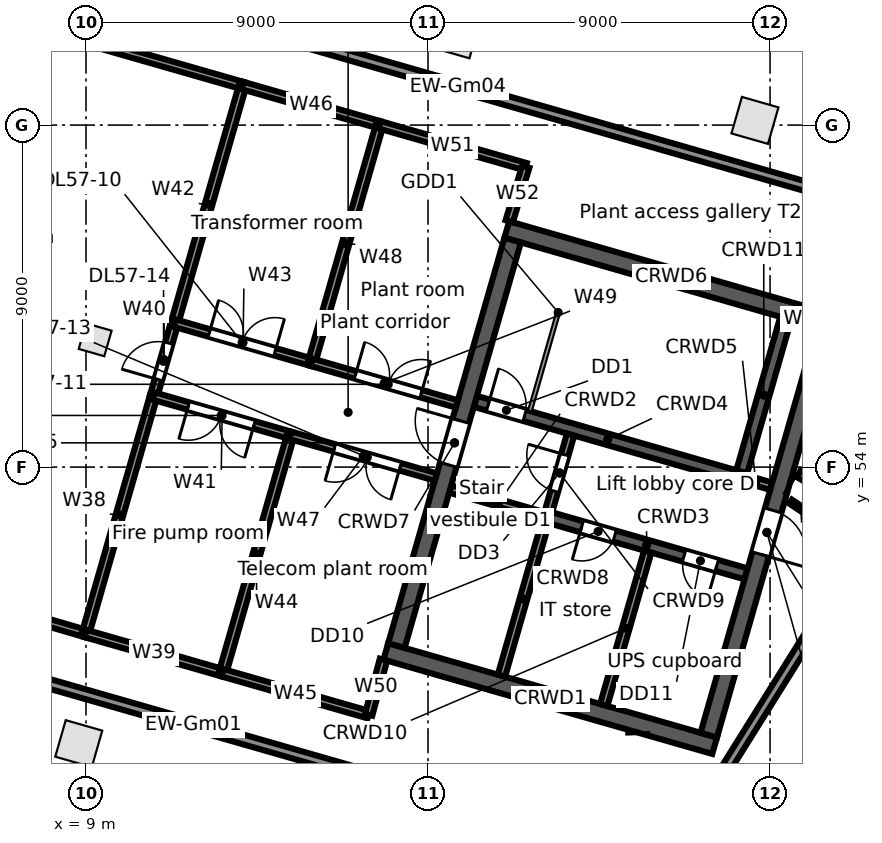
"""IFC4 building model, lengths in metres.
Left out: names, types, materials, properties, quantities, classifications, styles, units other than length and angle.
Written with IfcOpenShell. Run it as: python <this file> out.ifc"""

import sys

from ifc_helpers import new_model, si_unit, direction, frame, frame_2d, origin, origin_2d, place, context, subcontext, project, spatial, rectangle, extrude, element, fill, save


model = new_model("IFC4")
c1 = context("Model", 3, precision=1e-05, world=origin(), true_north=direction((0.0, 1.0)))
c2 = subcontext(c1, "Body", "Model", "MODEL_VIEW")
j1 = project(units=[si_unit("LENGTHUNIT", "METRE"), si_unit("PLANEANGLEUNIT", "RADIAN")], contexts=[c1])
p1 = place(None, origin())
s1 = spatial("IfcSite", under=j1, at=p1, CompositionType="ELEMENT")
p2 = place(p1, origin())
s2 = spatial("IfcBuilding", under=s1, at=p2, CompositionType="ELEMENT")
p3 = place(p2, frame((0.0, 0.0, 258.2)))
s3 = spatial("IfcBuildingStorey", under=s2, at=p3, CompositionType="ELEMENT", Elevation=258.2)
for number, where, z_axis, x_axis in (
    (1, (26.603, 63.124, 0.0), (0.0, 0.0, 1.0), (-0.961, 0.276, 0.0)),
    (2, (18.746, 65.376, 0.0), (0.0, 0.0, 1.0), (-0.961, 0.276, 0.0)),
    (3, (8.81, 46.722, 0.0), (0.0, 0.0, 1.0), (0.961, -0.276, 0.0)),
):
    element("IfcColumn", number, at=place(p3, frame(where, z_axis=z_axis, x_axis=x_axis)), inside=s3, PredefinedType="COLUMN", context=c2, shape_type="SweptSolid", body=[
        extrude(rectangle(XDim=1.0, YDim=1.0, at=origin_2d()), origin(), (0.0, 0.0, 1.0), 4.22),
    ])
p4 = place(p3, frame((9.241, 57.35, 0.0), z_axis=(0.0, 0.0, 1.0), x_axis=(0.961261695938, -0.275637355817, 0.0)))
e4 = element("IfcColumn", 4, at=p4, inside=s3, PredefinedType="COLUMN", context=c2, shape_type="SweptSolid", body=[
    extrude(rectangle(XDim=0.7, YDim=0.7, at=origin_2d()), origin(), (0.0, 0.0, 1.0), 4.22),
])
p5 = place(p3, frame((23.919, 43.742, 0.0), z_axis=(0.0, 0.0, 1.0), x_axis=(-0.96126099052, 0.27563981589, 0.0)))
e5 = element("IfcWall", 5, at=p5, inside=s3, PredefinedType="STANDARD", context=c2, shape_type="SweptSolid", body=[
    extrude(rectangle(XDim=25.163, YDim=0.25, at=frame_2d((12.581, 0.0))), origin(), (0.0, 0.0, 1.0), 3.52),
])
p6 = place(p3, frame((34.364, 59.711, 0.0), z_axis=(0.0, 0.0, 1.0), x_axis=(-0.529923238965, -0.848045612455, 0.0)))
e6 = element("IfcWall", 6, at=p6, inside=s3, PredefinedType="STANDARD", context=c2, shape_type="SweptSolid", body=[
    extrude(rectangle(XDim=18.554, YDim=0.25, at=frame_2d((9.277, 0.0))), origin(), (0.0, 0.0, 1.0), 4.22),
])
p7 = place(p3, frame((3.135, 68.5, 0.0), z_axis=(0.0, 0.0, 1.0), x_axis=(0.961262369705, -0.275635006103, 0.0)))
e7 = element("IfcWall", 7, at=p7, inside=s3, PredefinedType="STANDARD", context=c2, shape_type="SweptSolid", body=[
    extrude(rectangle(XDim=32.562, YDim=0.25, at=frame_2d((16.281, 0.0))), origin(), (0.0, 0.0, 1.0), 3.52),
])
p8 = place(p3, frame((16.89, 49.149, 0.0), z_axis=(0.0, 0.0, 1.0), x_axis=(0.96126248289, -0.275634611374, 0.0)))
e8 = element("IfcWall", 8, at=p8, inside=s3, PredefinedType="SOLIDWALL", context=c2, shape_type="SweptSolid", body=[
    extrude(rectangle(XDim=9.0, YDim=0.45, at=frame_2d((4.5, 0.0))), origin(), (0.0, 0.0, 1.0), 4.22),
])
p9 = place(p3, frame((18.583, 53.423, 0.0), z_axis=(0.0, 0.0, 1.0), x_axis=(0.961259287968, -0.275645753268, 0.0)))
e9 = element("IfcWall", 9, at=p9, inside=s3, PredefinedType="SOLIDWALL", context=c2, shape_type="SweptSolid", body=[
    extrude(rectangle(XDim=2.65, YDim=0.2, at=frame_2d((1.325, 0.0))), origin(), (0.0, 0.0, 1.0), 4.22),
])
p10 = place(p3, frame((21.131, 52.692, 0.0), z_axis=(0.0, 0.0, 1.0), x_axis=(0.961261488075, -0.275638080722, 0.0)))
e10 = element("IfcWall", 10, at=p10, inside=s3, PredefinedType="SOLIDWALL", context=c2, shape_type="SweptSolid", body=[
    extrude(rectangle(XDim=5.45, YDim=0.3, at=frame_2d((2.725, 0.0))), origin(), (0.0, 0.0, 1.0), 4.22),
])
p11 = place(p10, frame((0.95, 0.0, 0.0)))
e11 = element("IfcOpeningElement", 11, at=p11, cuts=e10, PredefinedType="OPENING", context=c2, shape_type="SweptSolid", body=[
    extrude(rectangle(XDim=0.9, YDim=2.1, at=frame_2d((0.45, 1.05))), frame((0.0, 0.16, 0.0), z_axis=(0.0, -1.0, 0.0), x_axis=(1.0, 0.0, 0.0)), (0.0, 0.0, 1.0), 0.32),
])
p12 = place(p10, frame((3.75, 0.0, 0.0)))
e12 = element("IfcOpeningElement", 12, at=p12, cuts=e10, PredefinedType="OPENING", context=c2, shape_type="SweptSolid", body=[
    extrude(rectangle(XDim=0.9, YDim=2.1, at=frame_2d((0.45, 1.05))), frame((0.0, 0.16, 0.0), z_axis=(0.0, -1.0, 0.0), x_axis=(1.0, 0.0, 0.0)), (0.0, 0.0, 1.0), 0.32),
])
p13 = place(p3, frame((19.245, 55.73, 0.0), z_axis=(0.0, 0.0, 1.0), x_axis=(0.961263007877, -0.275632780503, 0.0)))
e13 = element("IfcWall", 13, at=p13, inside=s3, PredefinedType="SOLIDWALL", context=c2, shape_type="SweptSolid", body=[
    extrude(rectangle(XDim=7.25, YDim=0.3, at=frame_2d((3.625, 0.0))), origin(), (0.0, 0.0, 1.0), 4.22),
])
p14 = place(p13, frame((0.35, 0.0, 0.0)))
e14 = element("IfcOpeningElement", 14, at=p14, cuts=e13, PredefinedType="OPENING", context=c2, shape_type="SweptSolid", body=[
    extrude(rectangle(XDim=1.0, YDim=2.1, at=frame_2d((0.5, 1.05))), frame((0.0, 0.16, 0.0), z_axis=(0.0, -1.0, 0.0), x_axis=(1.0, 0.0, 0.0)), (0.0, 0.0, 1.0), 0.32),
])
p15 = place(p3, frame((26.214, 53.732, 0.0), z_axis=(0.0, 0.0, 1.0), x_axis=(0.961241665642, -0.275707200184, 0.0)))
e15 = element("IfcWall", 15, at=p15, inside=s3, PredefinedType="SOLIDWALL", context=c2, shape_type="SweptSolid", body=[
    extrude(rectangle(XDim=0.85, YDim=0.2, at=frame_2d((0.425, 0.0))), origin(), (0.0, 0.0, 1.0), 4.22),
])
p16 = place(p3, frame((20.073, 60.252, 0.0), z_axis=(0.0, 0.0, 1.0), x_axis=(0.96126248289, -0.275634611374, 0.0)))
e16 = element("IfcWall", 16, at=p16, inside=s3, PredefinedType="SOLIDWALL", context=c2, shape_type="SweptSolid", body=[
    extrude(rectangle(XDim=9.0, YDim=0.45, at=frame_2d((4.5, 0.0))), origin(), (0.0, 0.0, 1.0), 4.22),
])
p17 = place(p3, frame((17.168, 49.303, 0.0), z_axis=(0.0, 0.0, 1.0), x_axis=(0.275638974822, 0.961261231695, 0.0)))
e17 = element("IfcWall", 17, at=p17, inside=s3, PredefinedType="SOLIDWALL", context=c2, shape_type="SweptSolid", body=[
    extrude(rectangle(XDim=11.1, YDim=0.45, at=frame_2d((5.55, 0.0))), origin(), (0.0, 0.0, 1.0), 4.22),
])
p18 = place(p17, frame((4.95, 0.0, 0.0)))
e18 = element("IfcOpeningElement", 18, at=p18, cuts=e17, PredefinedType="OPENING", context=c2, shape_type="SweptSolid", body=[
    extrude(rectangle(XDim=1.2, YDim=2.1, at=frame_2d((0.6, 1.05))), frame((0.0, 0.235, 0.0), z_axis=(0.0, -1.0, 0.0), x_axis=(1.0, 0.0, 0.0)), (0.0, 0.0, 1.0), 0.47),
])
p19 = place(p3, frame((19.932, 48.511, 0.0), z_axis=(0.0, 0.0, 1.0), x_axis=(0.275642273411, 0.961260285827, 0.0)))
e19 = element("IfcWall", 19, at=p19, inside=s3, PredefinedType="SOLIDWALL", context=c2, shape_type="SweptSolid", body=[
    extrude(rectangle(XDim=4.2, YDim=0.2, at=frame_2d((2.1, 0.0))), origin(), (0.0, 0.0, 1.0), 4.22),
])
p20 = place(p3, frame((21.172, 52.837, 0.0), z_axis=(0.0, 0.0, 1.0), x_axis=(0.275657676022, 0.961255868981, 0.0)))
e20 = element("IfcWall", 20, at=p20, inside=s3, PredefinedType="PARTITIONING", context=c2, shape_type="SweptSolid", body=[
    extrude(rectangle(XDim=2.1, YDim=0.2, at=frame_2d((1.05, 0.0))), origin(), (0.0, 0.0, 1.0), 4.22),
])
p21 = place(p20, frame((0.55, 0.0, 0.0)))
e21 = element("IfcOpeningElement", 21, at=p21, cuts=e20, PredefinedType="OPENING", context=c2, shape_type="SweptSolid", body=[
    extrude(rectangle(XDim=1.0, YDim=2.1, at=frame_2d((0.5, 1.05))), frame((0.0, 0.11, 0.0), z_axis=(0.0, -1.0, 0.0), x_axis=(1.0, 0.0, 0.0)), (0.0, 0.0, 1.0), 0.22),
])
p22 = place(p3, frame((22.623, 47.739, 0.0), z_axis=(0.0, 0.0, 1.0), x_axis=(0.275642273411, 0.961260285827, 0.0)))
e22 = element("IfcWall", 22, at=p22, inside=s3, PredefinedType="PARTITIONING", context=c2, shape_type="SweptSolid", body=[
    extrude(rectangle(XDim=4.2, YDim=0.2, at=frame_2d((2.1, 0.0))), origin(), (0.0, 0.0, 1.0), 4.22),
])
p23 = place(p3, frame((26.256, 53.876, 0.0), z_axis=(0.0, 0.0, 1.0), x_axis=(0.275588560745, 0.96127568636, 0.0)))
e23 = element("IfcWall", 23, at=p23, inside=s3, PredefinedType="SOLIDWALL", context=c2, shape_type="SweptSolid", body=[
    extrude(rectangle(XDim=4.2, YDim=0.3, at=frame_2d((2.1, 0.0))), origin(), (0.0, 0.0, 1.0), 4.22),
])
p24 = place(p3, frame((25.387, 46.947, 0.0), z_axis=(0.0, 0.0, 1.0), x_axis=(0.275638974822, 0.961261231695, 0.0)))
e24 = element("IfcWall", 24, at=p24, inside=s3, PredefinedType="SOLIDWALL", context=c2, shape_type="SweptSolid", body=[
    extrude(rectangle(XDim=11.1, YDim=0.45, at=frame_2d((5.55, 0.0))), origin(), (0.0, 0.0, 1.0), 4.22),
])
p25 = place(p24, frame((4.95, 0.0, 0.0)))
e25 = element("IfcOpeningElement", 25, at=p25, cuts=e24, PredefinedType="OPENING", context=c2, shape_type="SweptSolid", body=[
    extrude(rectangle(XDim=1.2, YDim=2.1, at=frame_2d((0.6, 1.05))), frame((0.0, 0.235, 0.0), z_axis=(0.0, -1.0, 0.0), x_axis=(1.0, 0.0, 0.0)), (0.0, 0.0, 1.0), 0.47),
])
p26 = place(p3, frame((0.0, 52.25, 0.0), z_axis=(0.0, 0.0, 1.0), x_axis=(0.959779227721, -0.280755826359, 0.0)))
e26 = element("IfcWall", 26, at=p26, inside=s3, PredefinedType="PARTITIONING", context=c2, shape_type="SweptSolid", body=[
    extrude(rectangle(XDim=9.364, YDim=0.2, at=frame_2d((4.682, 0.0))), origin(), (0.0, 0.0, 1.0), 3.5),
])
p27 = place(p3, frame((3.029, 66.934, 0.0), z_axis=(0.0, 0.0, 1.0), x_axis=(0.961263796718, -0.275630029421, 0.0)))
e27 = element("IfcWall", 27, at=p27, inside=s3, PredefinedType="PARTITIONING", context=c2, shape_type="SweptSolid", body=[
    extrude(rectangle(XDim=10.5, YDim=0.2, at=frame_2d((5.25, 0.0))), origin(), (0.0, 0.0, 1.0), 3.5),
])
p28 = place(p3, frame((8.987, 49.621, 0.0), z_axis=(0.0, 0.0, 1.0), x_axis=(0.275703259795, 0.961242795832, 0.0)))
e28 = element("IfcWall", 28, at=p28, inside=s3, PredefinedType="PARTITIONING", context=c2, shape_type="SweptSolid", body=[
    extrude(rectangle(XDim=6.5, YDim=0.2, at=frame_2d((3.25, 0.0))), origin(), (0.0, 0.0, 1.0), 3.5),
])
p29 = place(p3, frame((8.987, 49.621, 0.0), z_axis=(0.0, 0.0, 1.0), x_axis=(0.961228613303, -0.275752702557, 0.0)))
e29 = element("IfcWall", 29, at=p29, inside=s3, PredefinedType="PARTITIONING", context=c2, shape_type="SweptSolid", body=[
    extrude(rectangle(XDim=3.75, YDim=0.2, at=frame_2d((1.875, 0.0))), origin(), (0.0, 0.0, 1.0), 3.5),
])
p30 = place(p3, frame((10.779, 55.869, 0.0), z_axis=(0.0, 0.0, 1.0), x_axis=(0.275575706981, 0.961279371318, 0.0)))
e30 = element("IfcWall", 30, at=p30, inside=s3, PredefinedType="PARTITIONING", context=c2, shape_type="SweptSolid", body=[
    extrude(rectangle(XDim=2.0, YDim=0.2, at=frame_2d((1.0, 0.0))), origin(), (0.0, 0.0, 1.0), 4.22),
])
p31 = place(p30, frame((0.45, 0.0, 0.0)))
e31 = element("IfcOpeningElement", 31, at=p31, cuts=e30, PredefinedType="OPENING", context=c2, shape_type="SweptSolid", body=[
    extrude(rectangle(XDim=1.0, YDim=2.1, at=frame_2d((0.5, 1.05))), frame((0.0, 0.11, 0.0), z_axis=(0.0, -1.0, 0.0), x_axis=(1.0, 0.0, 0.0)), (0.0, 0.0, 1.0), 0.22),
])
p32 = place(p3, frame((10.779, 55.869, 0.0), z_axis=(0.0, 0.0, 1.0), x_axis=(0.961245866545, -0.275692553489, 0.0)))
e32 = element("IfcWall", 32, at=p32, inside=s3, PredefinedType="PARTITIONING", context=c2, shape_type="SweptSolid", body=[
    extrude(rectangle(XDim=3.75, YDim=0.2, at=frame_2d((1.875, 0.0))), origin(), (0.0, 0.0, 1.0), 4.22),
])
p33 = place(p32, frame((0.95, 0.0, 0.0)))
e33 = element("IfcOpeningElement", 33, at=p33, cuts=e32, PredefinedType="OPENING", context=c2, shape_type="SweptSolid", body=[
    extrude(rectangle(XDim=1.8, YDim=2.1, at=frame_2d((0.9, 1.05))), frame((0.0, 0.11, 0.0), z_axis=(0.0, -1.0, 0.0), x_axis=(1.0, 0.0, 0.0)), (0.0, 0.0, 1.0), 0.22),
])
p34 = place(p3, frame((11.33, 57.791, 0.0), z_axis=(0.0, 0.0, 1.0), x_axis=(0.27565349575, 0.96125706774, 0.0)))
e34 = element("IfcWall", 34, at=p34, inside=s3, PredefinedType="PARTITIONING", context=c2, shape_type="SweptSolid", body=[
    extrude(rectangle(XDim=6.501, YDim=0.2, at=frame_2d((3.25, 0.0))), origin(), (0.0, 0.0, 1.0), 4.22),
])
p35 = place(p3, frame((11.33, 57.791, 0.0), z_axis=(0.0, 0.0, 1.0), x_axis=(0.961314848061, -0.275451924837, 0.0)))
e35 = element("IfcWall", 35, at=p35, inside=s3, PredefinedType="PARTITIONING", context=c2, shape_type="SweptSolid", body=[
    extrude(rectangle(XDim=3.75, YDim=0.2, at=frame_2d((1.875, 0.0))), origin(), (0.0, 0.0, 1.0), 4.22),
])
p36 = place(p35, frame((0.95, 0.0, 0.0)))
e36 = element("IfcOpeningElement", 36, at=p36, cuts=e35, PredefinedType="OPENING", context=c2, shape_type="SweptSolid", body=[
    extrude(rectangle(XDim=1.8, YDim=2.1, at=frame_2d((0.9, 1.05))), frame((0.0, 0.11, 0.0), z_axis=(0.0, -1.0, 0.0), x_axis=(1.0, 0.0, 0.0)), (0.0, 0.0, 1.0), 0.22),
])
p37 = place(p3, frame((12.592, 48.587, 0.0), z_axis=(0.0, 0.0, 1.0), x_axis=(0.275693305607, 0.961245650832, 0.0)))
e37 = element("IfcWall", 37, at=p37, inside=s3, PredefinedType="PARTITIONING", context=c2, shape_type="SweptSolid", body=[
    extrude(rectangle(XDim=6.5, YDim=0.2, at=frame_2d((3.25, 0.0))), origin(), (0.0, 0.0, 1.0), 4.22),
])
p38 = place(p3, frame((12.592, 48.587, 0.0), z_axis=(0.0, 0.0, 1.0), x_axis=(0.961228587008, -0.275752794216, 0.0)))
e38 = element("IfcWall", 38, at=p38, inside=s3, PredefinedType="PARTITIONING", context=c2, shape_type="SweptSolid", body=[
    extrude(rectangle(XDim=4.0, YDim=0.2, at=frame_2d((2.0, 0.0))), origin(), (0.0, 0.0, 1.0), 4.22),
])
p39 = place(p3, frame((13.122, 64.04, 0.0), z_axis=(0.0, 0.0, 1.0), x_axis=(0.961245866545, -0.275692553489, 0.0)))
e39 = element("IfcWall", 39, at=p39, inside=s3, PredefinedType="PARTITIONING", context=c2, shape_type="SweptSolid", body=[
    extrude(rectangle(XDim=3.75, YDim=0.2, at=frame_2d((1.875, 0.0))), origin(), (0.0, 0.0, 1.0), 4.22),
])
p40 = place(p3, frame((14.384, 54.835, 0.0), z_axis=(0.0, 0.0, 1.0), x_axis=(0.961261679898, -0.275637411757, 0.0)))
e40 = element("IfcWall", 40, at=p40, inside=s3, PredefinedType="PARTITIONING", context=c2, shape_type="SweptSolid", body=[
    extrude(rectangle(XDim=3.976, YDim=0.2, at=frame_2d((1.988, 0.0))), origin(), (0.0, 0.0, 1.0), 4.22),
])
p41 = place(p40, frame((1.2, 0.0, 0.0)))
e41 = element("IfcOpeningElement", 41, at=p41, cuts=e40, PredefinedType="OPENING", context=c2, shape_type="SweptSolid", body=[
    extrude(rectangle(XDim=1.8, YDim=2.1, at=frame_2d((0.9, 1.05))), frame((0.0, 0.11, 0.0), z_axis=(0.0, -1.0, 0.0), x_axis=(1.0, 0.0, 0.0)), (0.0, 0.0, 1.0), 0.22),
])
p42 = place(p3, frame((14.935, 56.758, 0.0), z_axis=(0.0, 0.0, 1.0), x_axis=(0.275693305607, 0.961245650832, 0.0)))
e42 = element("IfcWall", 42, at=p42, inside=s3, PredefinedType="PARTITIONING", context=c2, shape_type="SweptSolid", body=[
    extrude(rectangle(XDim=6.5, YDim=0.2, at=frame_2d((3.25, 0.0))), origin(), (0.0, 0.0, 1.0), 4.22),
])
p43 = place(p3, frame((14.935, 56.758, 0.0), z_axis=(0.0, 0.0, 1.0), x_axis=(0.961261679898, -0.275637411757, 0.0)))
e43 = element("IfcWall", 43, at=p43, inside=s3, PredefinedType="PARTITIONING", context=c2, shape_type="SweptSolid", body=[
    extrude(rectangle(XDim=3.976, YDim=0.2, at=frame_2d((1.988, 0.0))), origin(), (0.0, 0.0, 1.0), 4.22),
])
p44 = place(p43, frame((1.2, 0.0, 0.0)))
e44 = element("IfcOpeningElement", 44, at=p44, cuts=e43, PredefinedType="OPENING", context=c2, shape_type="SweptSolid", body=[
    extrude(rectangle(XDim=1.8, YDim=2.1, at=frame_2d((0.9, 1.05))), frame((0.0, 0.11, 0.0), z_axis=(0.0, -1.0, 0.0), x_axis=(1.0, 0.0, 0.0)), (0.0, 0.0, 1.0), 0.22),
])
p45 = place(p3, frame((16.437, 47.484, 0.0), z_axis=(0.0, 0.0, 1.0), x_axis=(0.260405090968, 0.965499450335, 0.0)))
e45 = element("IfcWall", 45, at=p45, inside=s3, PredefinedType="PARTITIONING", context=c2, shape_type="SweptSolid", body=[
    extrude(rectangle(XDim=1.501, YDim=0.2, at=frame_2d((0.75, 0.0))), origin(), (0.0, 0.0, 1.0), 4.22),
])
p46 = place(p3, frame((16.727, 63.006, 0.0), z_axis=(0.0, 0.0, 1.0), x_axis=(0.961293276216, -0.275527198479, 0.0)))
e46 = element("IfcWall", 46, at=p46, inside=s3, PredefinedType="PARTITIONING", context=c2, shape_type="SweptSolid", body=[
    extrude(rectangle(XDim=4.0, YDim=0.2, at=frame_2d((2.0, 0.0))), origin(), (0.0, 0.0, 1.0), 4.22),
])
p47 = place(p3, frame((20.136, 60.468, 0.0), z_axis=(0.0, 0.0, 1.0), x_axis=(0.290540119102, 0.956862811061, 0.0)))
e47 = element("IfcWall", 47, at=p47, inside=s3, PredefinedType="PARTITIONING", context=c2, shape_type="SweptSolid", body=[
    extrude(rectangle(XDim=1.501, YDim=0.2, at=frame_2d((0.75, 0.0))), origin(), (0.0, 0.0, 1.0), 4.22),
])
p48 = place(p3, frame((27.54, 53.093, 0.0), z_axis=(0.0, 0.0, 1.0), x_axis=(0.829228861546, -0.558909201195, 0.0)))
e48 = element("IfcWall", 48, at=p48, inside=s3, PredefinedType="PARTITIONING", context=c2, shape_type="SweptSolid", body=[
    extrude(rectangle(XDim=0.655, YDim=0.125, at=frame_2d((0.327, 0.0))), origin(), (0.0, 0.0, 1.0), 4.22),
])
p49 = place(p3, frame((27.75, 53.825, 0.0), z_axis=(0.0, 0.0, 1.0), x_axis=(0.868208945987, -0.49619877681, 0.0)))
e49 = element("IfcWall", 49, at=p49, inside=s3, PredefinedType="PARTITIONING", context=c2, shape_type="SweptSolid", body=[
    extrude(rectangle(XDim=0.879, YDim=0.2, at=frame_2d((0.439, 0.0))), origin(), (0.0, 0.0, 1.0), 4.22),
])
p50 = place(p14, origin())
e50 = element("IfcDoor", 50, at=p50, inside=s3, OperationType="SINGLE_SWING_LEFT", PredefinedType="DOOR", context=c2, shape_type="SweptSolid", body=[
    extrude(rectangle(XDim=1.0, YDim=2.1, at=frame_2d((0.5, 1.05))), frame((0.0, 0.025, 0.0), z_axis=(0.0, -1.0, 0.0), x_axis=(1.0, 0.0, 0.0)), (0.0, 0.0, 1.0), 0.05),
])
fill(e14, e50)
p51 = place(p21, origin())
e51 = element("IfcDoor", 51, at=p51, inside=s3, OperationType="SINGLE_SWING_RIGHT", PredefinedType="DOOR", context=c2, shape_type="SweptSolid", body=[
    extrude(rectangle(XDim=1.0, YDim=2.1, at=frame_2d((0.5, 1.05))), frame((0.0, 0.025, 0.0), z_axis=(0.0, -1.0, 0.0), x_axis=(1.0, 0.0, 0.0)), (0.0, 0.0, 1.0), 0.05),
])
fill(e21, e51)
p52 = place(p18, origin())
e52 = element("IfcDoor", 52, at=p52, inside=s3, OperationType="SINGLE_SWING_RIGHT", PredefinedType="DOOR", context=c2, shape_type="SweptSolid", body=[
    extrude(rectangle(XDim=1.2, YDim=2.1, at=frame_2d((0.6, 1.05))), frame((0.0, 0.025, 0.0), z_axis=(0.0, -1.0, 0.0), x_axis=(1.0, 0.0, 0.0)), (0.0, 0.0, 1.0), 0.05),
])
fill(e18, e52)
p53 = place(p25, frame((1.2, 0.0, 0.0), z_axis=(0.0, 0.0, 1.0), x_axis=(-1.0, 0.0, 0.0)))
e53 = element("IfcDoor", 53, at=p53, inside=s3, OperationType="SINGLE_SWING_RIGHT", PredefinedType="DOOR", context=c2, shape_type="SweptSolid", body=[
    extrude(rectangle(XDim=1.2, YDim=2.1, at=frame_2d((0.6, 1.05))), frame((0.0, 0.025, 0.0), z_axis=(0.0, -1.0, 0.0), x_axis=(1.0, 0.0, 0.0)), (0.0, 0.0, 1.0), 0.05),
])
fill(e25, e53)
p54 = place(p11, frame((0.9, 0.0, 0.0), z_axis=(0.0, 0.0, 1.0), x_axis=(-1.0, 0.0, 0.0)))
e54 = element("IfcDoor", 54, at=p54, inside=s3, OperationType="SINGLE_SWING_RIGHT", PredefinedType="DOOR", context=c2, shape_type="SweptSolid", body=[
    extrude(rectangle(XDim=0.9, YDim=2.1, at=frame_2d((0.45, 1.05))), frame((0.0, 0.025, 0.0), z_axis=(0.0, -1.0, 0.0), x_axis=(1.0, 0.0, 0.0)), (0.0, 0.0, 1.0), 0.05),
])
fill(e11, e54)
p55 = place(p12, frame((0.9, 0.0, 0.0), z_axis=(0.0, 0.0, 1.0), x_axis=(-1.0, 0.0, 0.0)))
e55 = element("IfcDoor", 55, at=p55, inside=s3, OperationType="SINGLE_SWING_LEFT", PredefinedType="DOOR", context=c2, shape_type="SweptSolid", body=[
    extrude(rectangle(XDim=0.9, YDim=2.1, at=frame_2d((0.45, 1.05))), frame((0.0, 0.025, 0.0), z_axis=(0.0, -1.0, 0.0), x_axis=(1.0, 0.0, 0.0)), (0.0, 0.0, 1.0), 0.05),
])
fill(e12, e55)
p56 = place(p36, origin())
e56 = element("IfcDoor", 56, at=p56, inside=s3, OperationType="DOUBLE_DOOR_SINGLE_SWING", PredefinedType="DOOR", context=c2, shape_type="SweptSolid", body=[
    extrude(rectangle(XDim=1.8, YDim=2.1, at=frame_2d((0.9, 1.05))), frame((0.0, 0.025, 0.0), z_axis=(0.0, -1.0, 0.0), x_axis=(1.0, 0.0, 0.0)), (0.0, 0.0, 1.0), 0.05),
])
fill(e36, e56)
p57 = place(p44, origin())
e57 = element("IfcDoor", 57, at=p57, inside=s3, OperationType="DOUBLE_DOOR_SINGLE_SWING", PredefinedType="DOOR", context=c2, shape_type="SweptSolid", body=[
    extrude(rectangle(XDim=1.8, YDim=2.1, at=frame_2d((0.9, 1.05))), frame((0.0, 0.025, 0.0), z_axis=(0.0, -1.0, 0.0), x_axis=(1.0, 0.0, 0.0)), (0.0, 0.0, 1.0), 0.05),
])
fill(e44, e57)
p58 = place(p33, frame((1.8, 0.0, 0.0), z_axis=(0.0, 0.0, 1.0), x_axis=(-1.0, 0.0, 0.0)))
e58 = element("IfcDoor", 58, at=p58, inside=s3, OperationType="DOUBLE_DOOR_SINGLE_SWING", PredefinedType="DOOR", context=c2, shape_type="SweptSolid", body=[
    extrude(rectangle(XDim=1.8, YDim=2.1, at=frame_2d((0.9, 1.05))), frame((0.0, 0.025, 0.0), z_axis=(0.0, -1.0, 0.0), x_axis=(1.0, 0.0, 0.0)), (0.0, 0.0, 1.0), 0.05),
])
fill(e33, e58)
p59 = place(p41, frame((1.8, 0.0, 0.0), z_axis=(0.0, 0.0, 1.0), x_axis=(-1.0, 0.0, 0.0)))
e59 = element("IfcDoor", 59, at=p59, inside=s3, OperationType="DOUBLE_DOOR_SINGLE_SWING", PredefinedType="DOOR", context=c2, shape_type="SweptSolid", body=[
    extrude(rectangle(XDim=1.8, YDim=2.1, at=frame_2d((0.9, 1.05))), frame((0.0, 0.025, 0.0), z_axis=(0.0, -1.0, 0.0), x_axis=(1.0, 0.0, 0.0)), (0.0, 0.0, 1.0), 0.05),
])
fill(e41, e59)
p60 = place(p31, origin())
e60 = element("IfcDoor", 60, at=p60, inside=s3, OperationType="SINGLE_SWING_LEFT", PredefinedType="DOOR", context=c2, shape_type="SweptSolid", body=[
    extrude(rectangle(XDim=1.0, YDim=2.1, at=frame_2d((0.5, 1.05))), frame((0.0, 0.025, 0.0), z_axis=(0.0, -1.0, 0.0), x_axis=(1.0, 0.0, 0.0)), (0.0, 0.0, 1.0), 0.05),
])
fill(e31, e60)
save(model, sys.argv[1])
